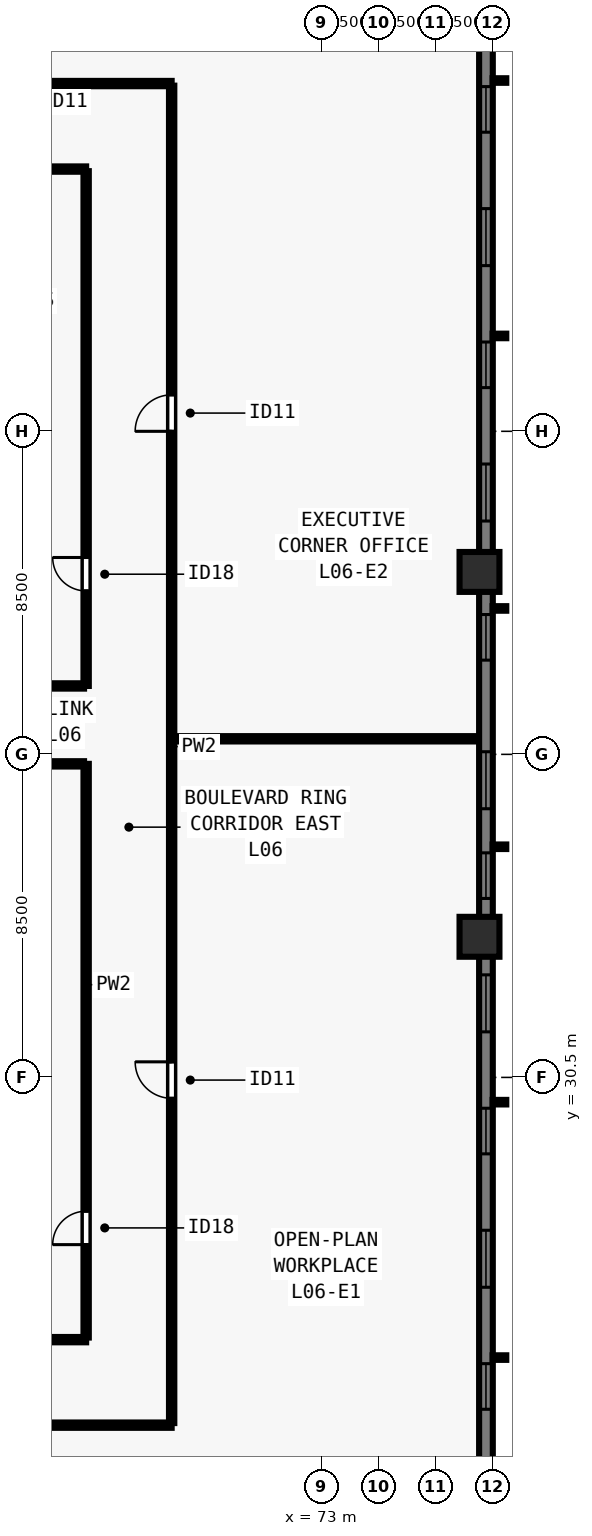
"""IFC4 building model, lengths in metres.
Left out: names, types, materials, properties, quantities, classifications, styles, units other than length and angle.
Written with IfcOpenShell. Run it as: python <this file> out.ifc"""

import sys

from ifc_helpers import new_model, si_unit, direction, frame, frame_2d, origin, origin_2d, place, context, subcontext, project, spatial, rectangle, extrude, element, fill, save


model = new_model("IFC4")
c1 = context("Model", 3, precision=1e-05, world=origin(), true_north=direction((0.0, 1.0)))
c2 = subcontext(c1, "Body", "Model", "MODEL_VIEW")
j1 = project(units=[si_unit("LENGTHUNIT", "METRE"), si_unit("PLANEANGLEUNIT", "RADIAN")], contexts=[c1])
p1 = place(None, origin())
s1 = spatial("IfcSite", under=j1, at=p1, CompositionType="ELEMENT")
p2 = place(p1, origin())
s2 = spatial("IfcBuilding", under=s1, at=p2, CompositionType="ELEMENT")
p3 = place(p2, frame((0.0, 0.0, 27.0)))
s3 = spatial("IfcBuildingStorey", under=s2, at=p3, CompositionType="ELEMENT", Elevation=27.0)
for number, where, z_axis, x_axis in (
    (1, (77.15, 34.2, 0.0), (0.0, 0.0, 1.0), (0.0, 1.0, 0.0)),
    (2, (77.15, 43.8, 0.0), (0.0, 0.0, 1.0), (0.0, 1.0, 0.0)),
):
    element("IfcColumn", number, at=place(p3, frame(where, z_axis=z_axis, x_axis=x_axis)), inside=s3, PredefinedType="COLUMN", context=c2, shape_type="SweptSolid", body=[
        extrude(rectangle(XDim=1.05, YDim=1.05, at=origin_2d()), origin(), (0.0, 0.0, 1.0), 3.5),
    ])
p4 = place(p3, frame((77.32, 61.5, 0.0), z_axis=(0.0, 0.0, 1.0), x_axis=(0.0, -1.0, 0.0)))
e3 = element("IfcWall", 3, at=p4, inside=s3, PredefinedType="SOLIDWALL", context=c2, shape_type="SweptSolid", body=[
    extrude(rectangle(XDim=44.662, YDim=0.36, at=frame_2d((22.331, 0.0))), origin(), (0.0, 0.0, 1.0), 3.28),
])
p5 = place(p4, frame((4.93, 0.0, 0.8)))
e4 = element("IfcOpeningElement", 4, at=p5, cuts=e3, PredefinedType="OPENING", context=c2, shape_type="SweptSolid", body=[
    extrude(rectangle(XDim=1.2, YDim=1.544, at=frame_2d((0.6, 0.772))), frame((0.0, 0.19, 0.0), z_axis=(0.0, -1.0, 0.0), x_axis=(1.0, 0.0, 0.0)), (0.0, 0.0, 1.0), 0.38),
])
p6 = place(p4, frame((8.14, 0.0, 0.8)))
e5 = element("IfcOpeningElement", 5, at=p6, cuts=e3, PredefinedType="OPENING", context=c2, shape_type="SweptSolid", body=[
    extrude(rectangle(XDim=1.5, YDim=1.544, at=frame_2d((0.75, 0.772))), frame((0.0, 0.19, 0.0), z_axis=(0.0, -1.0, 0.0), x_axis=(1.0, 0.0, 0.0)), (0.0, 0.0, 1.0), 0.38),
])
p7 = place(p4, frame((11.65, 0.0, 0.8)))
e6 = element("IfcOpeningElement", 6, at=p7, cuts=e3, PredefinedType="OPENING", context=c2, shape_type="SweptSolid", body=[
    extrude(rectangle(XDim=1.2, YDim=1.544, at=frame_2d((0.6, 0.772))), frame((0.0, 0.19, 0.0), z_axis=(0.0, -1.0, 0.0), x_axis=(1.0, 0.0, 0.0)), (0.0, 0.0, 1.0), 0.38),
])
p8 = place(p4, frame((14.861, 0.0, 0.8)))
e7 = element("IfcOpeningElement", 7, at=p8, cuts=e3, PredefinedType="OPENING", context=c2, shape_type="SweptSolid", body=[
    extrude(rectangle(XDim=1.5, YDim=1.544, at=frame_2d((0.75, 0.772))), frame((0.0, 0.19, 0.0), z_axis=(0.0, -1.0, 0.0), x_axis=(1.0, 0.0, 0.0)), (0.0, 0.0, 1.0), 0.38),
])
p9 = place(p4, frame((18.821, 0.0, 0.8)))
e8 = element("IfcOpeningElement", 8, at=p9, cuts=e3, PredefinedType="OPENING", context=c2, shape_type="SweptSolid", body=[
    extrude(rectangle(XDim=1.2, YDim=1.544, at=frame_2d((0.6, 0.772))), frame((0.0, 0.19, 0.0), z_axis=(0.0, -1.0, 0.0), x_axis=(1.0, 0.0, 0.0)), (0.0, 0.0, 1.0), 0.38),
])
p10 = place(p4, frame((22.431, 0.0, 0.8)))
e9 = element("IfcOpeningElement", 9, at=p10, cuts=e3, PredefinedType="OPENING", context=c2, shape_type="SweptSolid", body=[
    extrude(rectangle(XDim=1.5, YDim=1.544, at=frame_2d((0.75, 0.772))), frame((0.0, 0.19, 0.0), z_axis=(0.0, -1.0, 0.0), x_axis=(1.0, 0.0, 0.0)), (0.0, 0.0, 1.0), 0.38),
])
p11 = place(p4, frame((25.091, 0.0, 0.8)))
e10 = element("IfcOpeningElement", 10, at=p11, cuts=e3, PredefinedType="OPENING", context=c2, shape_type="SweptSolid", body=[
    extrude(rectangle(XDim=1.2, YDim=1.544, at=frame_2d((0.6, 0.772))), frame((0.0, 0.19, 0.0), z_axis=(0.0, -1.0, 0.0), x_axis=(1.0, 0.0, 0.0)), (0.0, 0.0, 1.0), 0.38),
])
p12 = place(p4, frame((28.302, 0.0, 0.8)))
e11 = element("IfcOpeningElement", 11, at=p12, cuts=e3, PredefinedType="OPENING", context=c2, shape_type="SweptSolid", body=[
    extrude(rectangle(XDim=1.5, YDim=1.544, at=frame_2d((0.75, 0.772))), frame((0.0, 0.19, 0.0), z_axis=(0.0, -1.0, 0.0), x_axis=(1.0, 0.0, 0.0)), (0.0, 0.0, 1.0), 0.38),
])
p13 = place(p4, frame((31.812, 0.0, 0.8)))
e12 = element("IfcOpeningElement", 12, at=p13, cuts=e3, PredefinedType="OPENING", context=c2, shape_type="SweptSolid", body=[
    extrude(rectangle(XDim=1.2, YDim=1.544, at=frame_2d((0.6, 0.772))), frame((0.0, 0.19, 0.0), z_axis=(0.0, -1.0, 0.0), x_axis=(1.0, 0.0, 0.0)), (0.0, 0.0, 1.0), 0.38),
])
p14 = place(p4, frame((35.022, 0.0, 0.8)))
e13 = element("IfcOpeningElement", 13, at=p14, cuts=e3, PredefinedType="OPENING", context=c2, shape_type="SweptSolid", body=[
    extrude(rectangle(XDim=1.5, YDim=1.544, at=frame_2d((0.75, 0.772))), frame((0.0, 0.19, 0.0), z_axis=(0.0, -1.0, 0.0), x_axis=(1.0, 0.0, 0.0)), (0.0, 0.0, 1.0), 0.38),
])
p15 = place(p4, frame((38.532, 0.0, 0.8)))
e14 = element("IfcOpeningElement", 14, at=p15, cuts=e3, PredefinedType="OPENING", context=c2, shape_type="SweptSolid", body=[
    extrude(rectangle(XDim=1.2, YDim=1.544, at=frame_2d((0.6, 0.772))), frame((0.0, 0.19, 0.0), z_axis=(0.0, -1.0, 0.0), x_axis=(1.0, 0.0, 0.0)), (0.0, 0.0, 1.0), 0.38),
])
p16 = place(p3, frame((34.95, 21.35, 0.0), z_axis=(0.0, 0.0, 1.0), x_axis=(1.0, 0.0, 0.0)))
e15 = element("IfcWall", 15, at=p16, inside=s3, PredefinedType="PARTITIONING", context=c2, shape_type="SweptSolid", body=[
    extrude(rectangle(XDim=34.1, YDim=0.14, at=frame_2d((17.05, 0.0))), origin(), (0.0, 0.0, 1.0), 3.28),
])
p17 = place(p16, frame((3.938, 0.0, 0.0)))
e16 = element("IfcOpeningElement", 16, at=p17, cuts=e15, PredefinedType="OPENING", context=c2, shape_type="SweptSolid", body=[
    extrude(rectangle(XDim=0.96, YDim=2.12, at=frame_2d((0.48, 1.06))), frame((0.0, 0.08, 0.0), z_axis=(0.0, -1.0, 0.0), x_axis=(1.0, 0.0, 0.0)), (0.0, 0.0, 1.0), 0.16),
])
p18 = place(p16, frame((28.617, 0.0, 0.0)))
e17 = element("IfcOpeningElement", 17, at=p18, cuts=e15, PredefinedType="OPENING", context=c2, shape_type="SweptSolid", body=[
    extrude(rectangle(XDim=0.96, YDim=2.12, at=frame_2d((0.48, 1.06))), frame((0.0, 0.08, 0.0), z_axis=(0.0, -1.0, 0.0), x_axis=(1.0, 0.0, 0.0)), (0.0, 0.0, 1.0), 0.16),
])
p19 = place(p3, frame((34.95, 56.65, 0.0), z_axis=(0.0, 0.0, 1.0), x_axis=(1.0, 0.0, 0.0)))
e18 = element("IfcWall", 18, at=p19, inside=s3, PredefinedType="PARTITIONING", context=c2, shape_type="SweptSolid", body=[
    extrude(rectangle(XDim=34.1, YDim=0.14, at=frame_2d((17.05, 0.0))), origin(), (0.0, 0.0, 1.0), 3.28),
])
p20 = place(p19, frame((4.522, 0.0, 0.0)))
e19 = element("IfcOpeningElement", 19, at=p20, cuts=e18, PredefinedType="OPENING", context=c2, shape_type="SweptSolid", body=[
    extrude(rectangle(XDim=0.96, YDim=2.12, at=frame_2d((0.48, 1.06))), frame((0.0, 0.08, 0.0), z_axis=(0.0, -1.0, 0.0), x_axis=(1.0, 0.0, 0.0)), (0.0, 0.0, 1.0), 0.16),
])
p21 = place(p19, frame((29.202, 0.0, 0.0)))
e20 = element("IfcOpeningElement", 20, at=p21, cuts=e18, PredefinedType="OPENING", context=c2, shape_type="SweptSolid", body=[
    extrude(rectangle(XDim=0.96, YDim=2.12, at=frame_2d((0.48, 1.06))), frame((0.0, 0.08, 0.0), z_axis=(0.0, -1.0, 0.0), x_axis=(1.0, 0.0, 0.0)), (0.0, 0.0, 1.0), 0.16),
])
p22 = place(p3, frame((69.05, 21.405, 0.0), z_axis=(0.0, 0.0, 1.0), x_axis=(0.0, 1.0, 0.0)))
e21 = element("IfcWall", 21, at=p22, inside=s3, PredefinedType="PARTITIONING", context=c2, shape_type="SweptSolid", body=[
    extrude(rectangle(XDim=35.19, YDim=0.14, at=frame_2d((17.595, 0.0))), origin(), (0.0, 0.0, 1.0), 3.28),
])
p23 = place(p22, frame((8.545, 0.0, 0.0)))
e22 = element("IfcOpeningElement", 22, at=p23, cuts=e21, PredefinedType="OPENING", context=c2, shape_type="SweptSolid", body=[
    extrude(rectangle(XDim=0.96, YDim=2.12, at=frame_2d((0.48, 1.06))), frame((0.0, 0.08, 0.0), z_axis=(0.0, -1.0, 0.0), x_axis=(1.0, 0.0, 0.0)), (0.0, 0.0, 1.0), 0.16),
])
p24 = place(p22, frame((26.095, 0.0, 0.0)))
e23 = element("IfcOpeningElement", 23, at=p24, cuts=e21, PredefinedType="OPENING", context=c2, shape_type="SweptSolid", body=[
    extrude(rectangle(XDim=0.96, YDim=2.12, at=frame_2d((0.48, 1.06))), frame((0.0, 0.08, 0.0), z_axis=(0.0, -1.0, 0.0), x_axis=(1.0, 0.0, 0.0)), (0.0, 0.0, 1.0), 0.16),
])
p25 = place(p3, frame((37.2, 23.6, 0.0), z_axis=(0.0, 0.0, 1.0), x_axis=(1.0, 0.0, 0.0)))
e24 = element("IfcWall", 24, at=p25, inside=s3, PredefinedType="PARTITIONING", context=c2, shape_type="SweptSolid", body=[
    extrude(rectangle(XDim=29.6, YDim=0.14, at=frame_2d((14.8, 0.0))), origin(), (0.0, 0.0, 1.0), 3.28),
])
p26 = place(p25, frame((1.2, 0.0, 0.0)))
e25 = element("IfcOpeningElement", 25, at=p26, cuts=e24, PredefinedType="OPENING", context=c2, shape_type="SweptSolid", body=[
    extrude(rectangle(XDim=0.88, YDim=2.1, at=frame_2d((0.44, 1.05))), frame((0.0, 0.08, 0.0), z_axis=(0.0, -1.0, 0.0), x_axis=(1.0, 0.0, 0.0)), (0.0, 0.0, 1.0), 0.16),
])
p27 = place(p25, frame((11.3, 0.0, 0.0)))
e26 = element("IfcOpeningElement", 26, at=p27, cuts=e24, PredefinedType="OPENING", context=c2, shape_type="SweptSolid", body=[
    extrude(rectangle(XDim=0.88, YDim=2.1, at=frame_2d((0.44, 1.05))), frame((0.0, 0.08, 0.0), z_axis=(0.0, -1.0, 0.0), x_axis=(1.0, 0.0, 0.0)), (0.0, 0.0, 1.0), 0.16),
])
p28 = place(p25, frame((21.8, 0.0, 0.0)))
e27 = element("IfcOpeningElement", 27, at=p28, cuts=e24, PredefinedType="OPENING", context=c2, shape_type="SweptSolid", body=[
    extrude(rectangle(XDim=0.88, YDim=2.1, at=frame_2d((0.44, 1.05))), frame((0.0, 0.08, 0.0), z_axis=(0.0, -1.0, 0.0), x_axis=(1.0, 0.0, 0.0)), (0.0, 0.0, 1.0), 0.16),
])
p29 = place(p3, frame((37.2, 54.4, 0.0), z_axis=(0.0, 0.0, 1.0), x_axis=(1.0, 0.0, 0.0)))
e28 = element("IfcWall", 28, at=p29, inside=s3, PredefinedType="PARTITIONING", context=c2, shape_type="SweptSolid", body=[
    extrude(rectangle(XDim=29.6, YDim=0.14, at=frame_2d((14.8, 0.0))), origin(), (0.0, 0.0, 1.0), 3.28),
])
p30 = place(p29, frame((2.2, 0.0, 0.0)))
e29 = element("IfcOpeningElement", 29, at=p30, cuts=e28, PredefinedType="OPENING", context=c2, shape_type="SweptSolid", body=[
    extrude(rectangle(XDim=0.88, YDim=2.1, at=frame_2d((0.44, 1.05))), frame((0.0, 0.08, 0.0), z_axis=(0.0, -1.0, 0.0), x_axis=(1.0, 0.0, 0.0)), (0.0, 0.0, 1.0), 0.16),
])
p31 = place(p29, frame((15.3, 0.0, 0.0)))
e30 = element("IfcOpeningElement", 30, at=p31, cuts=e28, PredefinedType="OPENING", context=c2, shape_type="SweptSolid", body=[
    extrude(rectangle(XDim=0.88, YDim=2.1, at=frame_2d((0.44, 1.05))), frame((0.0, 0.08, 0.0), z_axis=(0.0, -1.0, 0.0), x_axis=(1.0, 0.0, 0.0)), (0.0, 0.0, 1.0), 0.16),
])
p32 = place(p29, frame((24.8, 0.0, 0.0)))
e31 = element("IfcOpeningElement", 31, at=p32, cuts=e28, PredefinedType="OPENING", context=c2, shape_type="SweptSolid", body=[
    extrude(rectangle(XDim=0.88, YDim=2.1, at=frame_2d((0.44, 1.05))), frame((0.0, 0.08, 0.0), z_axis=(0.0, -1.0, 0.0), x_axis=(1.0, 0.0, 0.0)), (0.0, 0.0, 1.0), 0.16),
])
p33 = place(p3, frame((66.8, 23.655, 0.0), z_axis=(0.0, 0.0, 1.0), x_axis=(0.0, 1.0, 0.0)))
e32 = element("IfcWall", 32, at=p33, inside=s3, PredefinedType="PARTITIONING", context=c2, shape_type="SweptSolid", body=[
    extrude(rectangle(XDim=15.095, YDim=0.14, at=frame_2d((7.547, 0.0))), origin(), (0.0, 0.0, 1.0), 3.28),
])
p34 = place(p33, frame((2.445, 0.0, 0.0)))
e33 = element("IfcOpeningElement", 33, at=p34, cuts=e32, PredefinedType="OPENING", context=c2, shape_type="SweptSolid", body=[
    extrude(rectangle(XDim=0.88, YDim=2.1, at=frame_2d((0.44, 1.05))), frame((0.0, 0.08, 0.0), z_axis=(0.0, -1.0, 0.0), x_axis=(1.0, 0.0, 0.0)), (0.0, 0.0, 1.0), 0.16),
])
p35 = place(p3, frame((66.8, 40.8, 0.0), z_axis=(0.0, 0.0, 1.0), x_axis=(0.0, 1.0, 0.0)))
e34 = element("IfcWall", 34, at=p35, inside=s3, PredefinedType="PARTITIONING", context=c2, shape_type="SweptSolid", body=[
    extrude(rectangle(XDim=13.545, YDim=0.14, at=frame_2d((6.772, 0.0))), origin(), (0.0, 0.0, 1.0), 3.28),
])
p36 = place(p35, frame((2.5, 0.0, 0.0)))
e35 = element("IfcOpeningElement", 35, at=p36, cuts=e34, PredefinedType="OPENING", context=c2, shape_type="SweptSolid", body=[
    extrude(rectangle(XDim=0.88, YDim=2.1, at=frame_2d((0.44, 1.05))), frame((0.0, 0.08, 0.0), z_axis=(0.0, -1.0, 0.0), x_axis=(1.0, 0.0, 0.0)), (0.0, 0.0, 1.0), 0.16),
])
for number, where, z_axis, x_axis in (
    (36, (60.76, 38.75, 0.0), (0.0, 0.0, 1.0), (1.0, 0.0, 0.0)),
    (37, (60.76, 40.8, 0.0), (0.0, 0.0, 1.0), (1.0, 0.0, 0.0)),
):
    element("IfcWall", number, at=place(p3, frame(where, z_axis=z_axis, x_axis=x_axis)), inside=s3, PredefinedType="PARTITIONING", context=c2, shape_type="SweptSolid", body=[
        extrude(rectangle(XDim=5.985, YDim=0.14, at=frame_2d((2.993, 0.0))), origin(), (0.0, 0.0, 1.0), 3.28),
    ])
p37 = place(p3, frame((69.15, 39.409, 0.0), z_axis=(0.0, 0.0, 1.0), x_axis=(1.0, 0.0, 0.0)))
e38 = element("IfcWall", 38, at=p37, inside=s3, PredefinedType="PARTITIONING", context=c2, shape_type="SweptSolid", body=[
    extrude(rectangle(XDim=7.93, YDim=0.14, at=frame_2d((3.965, 0.0))), origin(), (0.0, 0.0, 1.0), 3.28),
])
p38 = place(p5, origin())
e39 = element("IfcWindow", 39, at=p38, inside=s3, PartitioningType="SINGLE_PANEL", PredefinedType="WINDOW", context=c2, shape_type="SweptSolid", body=[
    extrude(rectangle(XDim=1.2, YDim=1.544, at=frame_2d((0.6, 0.772))), frame((0.0, -0.05, 0.0), z_axis=(0.0, -1.0, 0.0), x_axis=(1.0, 0.0, 0.0)), (0.0, 0.0, 1.0), 0.06),
])
fill(e4, e39)
p39 = place(p6, origin())
e40 = element("IfcWindow", 40, at=p39, inside=s3, PartitioningType="SINGLE_PANEL", PredefinedType="WINDOW", context=c2, shape_type="SweptSolid", body=[
    extrude(rectangle(XDim=1.5, YDim=1.544, at=frame_2d((0.75, 0.772))), frame((0.0, -0.05, 0.0), z_axis=(0.0, -1.0, 0.0), x_axis=(1.0, 0.0, 0.0)), (0.0, 0.0, 1.0), 0.06),
])
fill(e5, e40)
p40 = place(p7, origin())
e41 = element("IfcWindow", 41, at=p40, inside=s3, PartitioningType="SINGLE_PANEL", PredefinedType="WINDOW", context=c2, shape_type="SweptSolid", body=[
    extrude(rectangle(XDim=1.2, YDim=1.544, at=frame_2d((0.6, 0.772))), frame((0.0, -0.05, 0.0), z_axis=(0.0, -1.0, 0.0), x_axis=(1.0, 0.0, 0.0)), (0.0, 0.0, 1.0), 0.06),
])
fill(e6, e41)
p41 = place(p8, origin())
e42 = element("IfcWindow", 42, at=p41, inside=s3, PartitioningType="SINGLE_PANEL", PredefinedType="WINDOW", context=c2, shape_type="SweptSolid", body=[
    extrude(rectangle(XDim=1.5, YDim=1.544, at=frame_2d((0.75, 0.772))), frame((0.0, -0.05, 0.0), z_axis=(0.0, -1.0, 0.0), x_axis=(1.0, 0.0, 0.0)), (0.0, 0.0, 1.0), 0.06),
])
fill(e7, e42)
p42 = place(p9, origin())
e43 = element("IfcWindow", 43, at=p42, inside=s3, PartitioningType="SINGLE_PANEL", PredefinedType="WINDOW", context=c2, shape_type="SweptSolid", body=[
    extrude(rectangle(XDim=1.2, YDim=1.544, at=frame_2d((0.6, 0.772))), frame((0.0, -0.05, 0.0), z_axis=(0.0, -1.0, 0.0), x_axis=(1.0, 0.0, 0.0)), (0.0, 0.0, 1.0), 0.06),
])
fill(e8, e43)
p43 = place(p10, origin())
e44 = element("IfcWindow", 44, at=p43, inside=s3, PartitioningType="SINGLE_PANEL", PredefinedType="WINDOW", context=c2, shape_type="SweptSolid", body=[
    extrude(rectangle(XDim=1.5, YDim=1.544, at=frame_2d((0.75, 0.772))), frame((0.0, -0.05, 0.0), z_axis=(0.0, -1.0, 0.0), x_axis=(1.0, 0.0, 0.0)), (0.0, 0.0, 1.0), 0.06),
])
fill(e9, e44)
p44 = place(p11, origin())
e45 = element("IfcWindow", 45, at=p44, inside=s3, PartitioningType="SINGLE_PANEL", PredefinedType="WINDOW", context=c2, shape_type="SweptSolid", body=[
    extrude(rectangle(XDim=1.2, YDim=1.544, at=frame_2d((0.6, 0.772))), frame((0.0, -0.05, 0.0), z_axis=(0.0, -1.0, 0.0), x_axis=(1.0, 0.0, 0.0)), (0.0, 0.0, 1.0), 0.06),
])
fill(e10, e45)
p45 = place(p12, origin())
e46 = element("IfcWindow", 46, at=p45, inside=s3, PartitioningType="SINGLE_PANEL", PredefinedType="WINDOW", context=c2, shape_type="SweptSolid", body=[
    extrude(rectangle(XDim=1.5, YDim=1.544, at=frame_2d((0.75, 0.772))), frame((0.0, -0.05, 0.0), z_axis=(0.0, -1.0, 0.0), x_axis=(1.0, 0.0, 0.0)), (0.0, 0.0, 1.0), 0.06),
])
fill(e11, e46)
p46 = place(p13, origin())
e47 = element("IfcWindow", 47, at=p46, inside=s3, PartitioningType="SINGLE_PANEL", PredefinedType="WINDOW", context=c2, shape_type="SweptSolid", body=[
    extrude(rectangle(XDim=1.2, YDim=1.544, at=frame_2d((0.6, 0.772))), frame((0.0, -0.05, 0.0), z_axis=(0.0, -1.0, 0.0), x_axis=(1.0, 0.0, 0.0)), (0.0, 0.0, 1.0), 0.06),
])
fill(e12, e47)
p47 = place(p14, origin())
e48 = element("IfcWindow", 48, at=p47, inside=s3, PartitioningType="SINGLE_PANEL", PredefinedType="WINDOW", context=c2, shape_type="SweptSolid", body=[
    extrude(rectangle(XDim=1.5, YDim=1.544, at=frame_2d((0.75, 0.772))), frame((0.0, -0.05, 0.0), z_axis=(0.0, -1.0, 0.0), x_axis=(1.0, 0.0, 0.0)), (0.0, 0.0, 1.0), 0.06),
])
fill(e13, e48)
p48 = place(p15, origin())
e49 = element("IfcWindow", 49, at=p48, inside=s3, PartitioningType="SINGLE_PANEL", PredefinedType="WINDOW", context=c2, shape_type="SweptSolid", body=[
    extrude(rectangle(XDim=1.2, YDim=1.544, at=frame_2d((0.6, 0.772))), frame((0.0, -0.05, 0.0), z_axis=(0.0, -1.0, 0.0), x_axis=(1.0, 0.0, 0.0)), (0.0, 0.0, 1.0), 0.06),
])
fill(e14, e49)
p49 = place(p34, origin())
e50 = element("IfcDoor", 50, at=p49, inside=s3, OperationType="SINGLE_SWING_LEFT", PredefinedType="DOOR", context=c2, shape_type="SweptSolid", body=[
    extrude(rectangle(XDim=0.88, YDim=2.1, at=frame_2d((0.44, 1.05))), frame((0.0, 0.025, 0.0), z_axis=(0.0, -1.0, 0.0), x_axis=(1.0, 0.0, 0.0)), (0.0, 0.0, 1.0), 0.05),
])
fill(e33, e50)
p50 = place(p36, origin())
e51 = element("IfcDoor", 51, at=p50, inside=s3, OperationType="SINGLE_SWING_RIGHT", PredefinedType="DOOR", context=c2, shape_type="SweptSolid", body=[
    extrude(rectangle(XDim=0.88, YDim=2.1, at=frame_2d((0.44, 1.05))), frame((0.0, 0.025, 0.0), z_axis=(0.0, -1.0, 0.0), x_axis=(1.0, 0.0, 0.0)), (0.0, 0.0, 1.0), 0.05),
])
fill(e35, e51)
p51 = place(p23, origin())
e52 = element("IfcDoor", 52, at=p51, inside=s3, OperationType="SINGLE_SWING_RIGHT", PredefinedType="DOOR", context=c2, shape_type="SweptSolid", body=[
    extrude(rectangle(XDim=0.96, YDim=2.12, at=frame_2d((0.48, 1.06))), frame((0.0, 0.025, 0.0), z_axis=(0.0, -1.0, 0.0), x_axis=(1.0, 0.0, 0.0)), (0.0, 0.0, 1.0), 0.05),
])
fill(e22, e52)
p52 = place(p24, origin())
e53 = element("IfcDoor", 53, at=p52, inside=s3, OperationType="SINGLE_SWING_LEFT", PredefinedType="DOOR", context=c2, shape_type="SweptSolid", body=[
    extrude(rectangle(XDim=0.96, YDim=2.12, at=frame_2d((0.48, 1.06))), frame((0.0, 0.025, 0.0), z_axis=(0.0, -1.0, 0.0), x_axis=(1.0, 0.0, 0.0)), (0.0, 0.0, 1.0), 0.05),
])
fill(e23, e53)
save(model, sys.argv[1])
